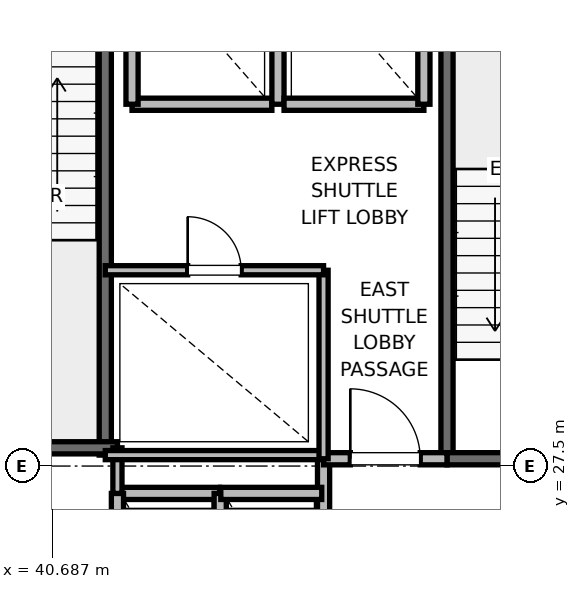
"""IFC4 building model, lengths in metres.
Left out: names, types, materials, properties, quantities, classifications, styles, units other than length and angle.
Written with IfcOpenShell. Run it as: python <this file> out.ifc"""

import sys

from ifc_helpers import new_model, si_unit, direction, frame, frame_2d, origin, place, context, subcontext, project, spatial, rectangle, extrude, element, fill, save


model = new_model("IFC4")
c1 = context("Model", 3, precision=1e-05, world=origin(), true_north=direction((0.0, 1.0)))
c2 = subcontext(c1, "Body", "Model", "MODEL_VIEW")
j1 = project(units=[si_unit("LENGTHUNIT", "METRE"), si_unit("PLANEANGLEUNIT", "RADIAN")], contexts=[c1])
p1 = place(None, origin())
s1 = spatial("IfcSite", under=j1, at=p1, CompositionType="ELEMENT")
p2 = place(p1, origin())
s2 = spatial("IfcBuilding", under=s1, at=p2, CompositionType="ELEMENT")
p3 = place(p2, frame((0.0, 0.0, 128.4)))
s3 = spatial("IfcBuildingStorey", under=s2, at=p3, CompositionType="ELEMENT", Elevation=128.4)
p4 = place(p3, frame((47.18, 27.62, 0.0), z_axis=(0.0, 0.0, 1.0), x_axis=(0.0, 1.0, 0.0)))
e1 = element("IfcWall", 1, at=p4, inside=s3, PredefinedType="SOLIDWALL", context=c2, shape_type="SweptSolid", body=[
    extrude(rectangle(XDim=8.18, YDim=0.2, at=frame_2d((4.09, 0.0))), origin(), (0.0, 0.0, 1.0), 3.775),
])
p5 = place(p3, frame((47.18, 27.62, 0.0), z_axis=(0.0, 0.0, 1.0), x_axis=(1.0, 0.0, 0.0)))
e2 = element("IfcWall", 2, at=p5, inside=s3, PredefinedType="SOLIDWALL", context=c2, shape_type="SweptSolid", body=[
    extrude(rectangle(XDim=3.12, YDim=0.2, at=frame_2d((1.56, 0.0))), origin(), (0.0, 0.0, 1.0), 3.775),
])
p6 = place(p5, frame((1.01, 0.0, 0.0)))
e3 = element("IfcOpeningElement", 3, at=p6, cuts=e2, PredefinedType="OPENING", context=c2, shape_type="SweptSolid", body=[
    extrude(rectangle(XDim=1.1, YDim=2.15, at=frame_2d((0.55, 1.075))), frame((0.0, 0.1, 0.0), z_axis=(0.0, -1.0, 0.0), x_axis=(1.0, 0.0, 0.0)), (0.0, 0.0, 1.0), 0.2),
])
p7 = place(p3, frame((41.56, 27.68, 0.0), z_axis=(0.0, 0.0, 1.0), x_axis=(0.0, 1.0, 0.0)))
e4 = element("IfcWall", 4, at=p7, inside=s3, PredefinedType="SOLIDWALL", context=c2, shape_type="SweptSolid", body=[
    extrude(rectangle(XDim=8.57, YDim=0.2, at=frame_2d((4.285, 0.0))), origin(), (0.0, 0.0, 1.0), 3.775),
])
p8 = place(p3, frame((38.44, 27.8, 0.0), z_axis=(0.0, 0.0, 1.0), x_axis=(1.0, 0.0, 0.0)))
e5 = element("IfcWall", 5, at=p8, inside=s3, PredefinedType="SOLIDWALL", context=c2, shape_type="SweptSolid", body=[
    extrude(rectangle(XDim=3.32, YDim=0.2, at=frame_2d((1.66, 0.0))), origin(), (0.0, 0.0, 1.0), 3.775),
])
p9 = place(p3, frame((45.15, 24.25, 0.0), z_axis=(0.0, 0.0, 1.0), x_axis=(0.0, 1.0, 0.0)))
e6 = element("IfcWall", 6, at=p9, inside=s3, PredefinedType="PARTITIONING", context=c2, shape_type="SweptSolid", body=[
    extrude(rectangle(XDim=3.37, YDim=0.2, at=frame_2d((1.685, 0.0))), origin(), (0.0, 0.0, 1.0), 3.775),
])
p10 = place(p3, frame((45.15, 27.62, 0.0), z_axis=(0.0, 0.0, 1.0), x_axis=(1.0, 0.0, 0.0)))
e7 = element("IfcWall", 7, at=p10, inside=s3, PredefinedType="PARTITIONING", context=c2, shape_type="SweptSolid", body=[
    extrude(rectangle(XDim=2.03, YDim=0.2, at=frame_2d((1.015, 0.0))), origin(), (0.0, 0.0, 1.0), 3.775),
])
p11 = place(p10, frame((0.44, 0.0, 0.0)))
e8 = element("IfcOpeningElement", 8, at=p11, cuts=e7, PredefinedType="OPENING", context=c2, shape_type="SweptSolid", body=[
    extrude(rectangle(XDim=1.15, YDim=2.2, at=frame_2d((0.575, 1.1))), frame((0.0, 0.1, 0.0), z_axis=(0.0, -1.0, 0.0), x_axis=(1.0, 0.0, 0.0)), (0.0, 0.0, 1.0), 0.2),
])
p12 = place(p3, frame((43.44, 27.05, 0.0), z_axis=(0.0, 0.0, 1.0), x_axis=(-1.0, 0.0, 0.0)))
e9 = element("IfcWall", 9, at=p12, inside=s3, PredefinedType="SOLIDWALL", context=c2, shape_type="SweptSolid", body=[
    extrude(rectangle(XDim=1.68, YDim=0.2, at=frame_2d((0.84, 0.0))), origin(), (0.0, 0.0, 1.0), 3.775),
])
for number, where, z_axis, x_axis in (
    (10, (41.76, 27.05, 0.0), (0.0, 0.0, 1.0), (0.0, -1.0, 0.0)),
    (11, (43.45, 24.45, 0.0), (0.0, 0.0, 1.0), (0.0, 1.0, 0.0)),
):
    element("IfcWall", number, at=place(p3, frame(where, z_axis=z_axis, x_axis=x_axis)), inside=s3, PredefinedType="SOLIDWALL", context=c2, shape_type="SweptSolid", body=[
        extrude(rectangle(XDim=2.6, YDim=0.2, at=frame_2d((1.3, 0.0))), origin(), (0.0, 0.0, 1.0), 3.775),
    ])
p13 = place(p3, frame((45.12, 27.05, 0.0), z_axis=(0.0, 0.0, 1.0), x_axis=(-1.0, 0.0, 0.0)))
e12 = element("IfcWall", 12, at=p13, inside=s3, PredefinedType="SOLIDWALL", context=c2, shape_type="SweptSolid", body=[
    extrude(rectangle(XDim=1.66, YDim=0.2, at=frame_2d((0.83, 0.0))), origin(), (0.0, 0.0, 1.0), 3.775),
])
p14 = place(p3, frame((42.0, 33.45, 0.0), z_axis=(0.0, 0.0, 1.0), x_axis=(1.0, 0.0, 0.0)))
e13 = element("IfcWall", 13, at=p14, inside=s3, PredefinedType="SOLIDWALL", context=c2, shape_type="SweptSolid", body=[
    extrude(rectangle(XDim=2.3, YDim=0.2, at=frame_2d((1.15, 0.0))), origin(), (0.0, 0.0, 1.0), 3.775),
])
for number, where, z_axis, x_axis in (
    (14, (42.0, 36.05, 0.0), (0.0, 0.0, 1.0), (0.0, -1.0, 0.0)),
    (15, (44.4, 33.45, 0.0), (0.0, 0.0, 1.0), (0.0, 1.0, 0.0)),
):
    element("IfcWall", number, at=place(p3, frame(where, z_axis=z_axis, x_axis=x_axis)), inside=s3, PredefinedType="SOLIDWALL", context=c2, shape_type="SweptSolid", body=[
        extrude(rectangle(XDim=2.6, YDim=0.2, at=frame_2d((1.3, 0.0))), origin(), (0.0, 0.0, 1.0), 2.755),
    ])
p15 = place(p3, frame((44.5, 33.45, 0.0), z_axis=(0.0, 0.0, 1.0), x_axis=(1.0, 0.0, 0.0)))
e16 = element("IfcWall", 16, at=p15, inside=s3, PredefinedType="SOLIDWALL", context=c2, shape_type="SweptSolid", body=[
    extrude(rectangle(XDim=2.3, YDim=0.2, at=frame_2d((1.15, 0.0))), origin(), (0.0, 0.0, 1.0), 3.775),
])
p16 = place(p3, frame((46.8, 33.45, 0.0), z_axis=(0.0, 0.0, 1.0), x_axis=(0.0, 1.0, 0.0)))
e17 = element("IfcWall", 17, at=p16, inside=s3, PredefinedType="SOLIDWALL", context=c2, shape_type="SweptSolid", body=[
    extrude(rectangle(XDim=2.6, YDim=0.2, at=frame_2d((1.3, 0.0))), origin(), (0.0, 0.0, 1.0), 3.775),
])
p17 = place(p3, frame((41.76, 27.05, 0.0), z_axis=(0.0, 0.0, 1.0), x_axis=(0.0, 1.0, 0.0)))
e18 = element("IfcWall", 18, at=p17, inside=s3, PredefinedType="PARTITIONING", context=c2, shape_type="SweptSolid", body=[
    extrude(rectangle(XDim=0.75, YDim=0.15, at=frame_2d((0.375, 0.0))), origin(), (0.0, 0.0, 1.0), 2.85),
])
p18 = place(p3, frame((41.56, 27.68, 0.0), z_axis=(0.0, 0.0, 1.0), x_axis=(1.0, 0.0, 0.0)))
e19 = element("IfcWall", 19, at=p18, inside=s3, PredefinedType="PARTITIONING", context=c2, shape_type="SweptSolid", body=[
    extrude(rectangle(XDim=3.59, YDim=0.15, at=frame_2d((1.795, 0.0))), origin(), (0.0, 0.0, 1.0), 2.85),
])
p19 = place(p3, frame((45.15, 27.62, 0.0), z_axis=(0.0, 0.0, 1.0), x_axis=(0.0, 1.0, 0.0)))
e20 = element("IfcWall", 20, at=p19, inside=s3, PredefinedType="PARTITIONING", context=c2, shape_type="SweptSolid", body=[
    extrude(rectangle(XDim=3.1, YDim=0.15, at=frame_2d((1.55, 0.0))), origin(), (0.0, 0.0, 1.0), 2.85),
])
p20 = place(p3, frame((41.56, 30.72, 0.0), z_axis=(0.0, 0.0, 1.0), x_axis=(1.0, 0.0, 0.0)))
e21 = element("IfcWall", 21, at=p20, inside=s3, PredefinedType="PARTITIONING", context=c2, shape_type="SweptSolid", body=[
    extrude(rectangle(XDim=3.59, YDim=0.15, at=frame_2d((1.795, 0.0))), origin(), (0.0, 0.0, 1.0), 2.85),
])
p21 = place(p20, frame((1.355, 0.0, 0.0)))
e22 = element("IfcOpeningElement", 22, at=p21, cuts=e21, PredefinedType="OPENING", context=c2, shape_type="SweptSolid", body=[
    extrude(rectangle(XDim=0.88, YDim=2.1, at=frame_2d((0.44, 1.05))), frame((0.0, 0.075, 0.0), z_axis=(0.0, -1.0, 0.0), x_axis=(1.0, 0.0, 0.0)), (0.0, 0.0, 1.0), 0.15),
])
p22 = place(p11, origin())
e23 = element("IfcDoor", 23, at=p22, inside=s3, OperationType="SINGLE_SWING_LEFT", PredefinedType="DOOR", context=c2, shape_type="SweptSolid", body=[
    extrude(rectangle(XDim=1.15, YDim=2.2, at=frame_2d((0.575, 1.1))), frame((0.0, 0.025, 0.0), z_axis=(0.0, -1.0, 0.0), x_axis=(1.0, 0.0, 0.0)), (0.0, 0.0, 1.0), 0.05),
])
fill(e8, e23)
p23 = place(p21, origin())
e24 = element("IfcDoor", 24, at=p23, inside=s3, OperationType="SINGLE_SWING_LEFT", PredefinedType="DOOR", context=c2, shape_type="SweptSolid", body=[
    extrude(rectangle(XDim=0.88, YDim=2.1, at=frame_2d((0.44, 1.05))), frame((0.0, 0.025, 0.0), z_axis=(0.0, -1.0, 0.0), x_axis=(1.0, 0.0, 0.0)), (0.0, 0.0, 1.0), 0.05),
])
fill(e22, e24)
save(model, sys.argv[1])
